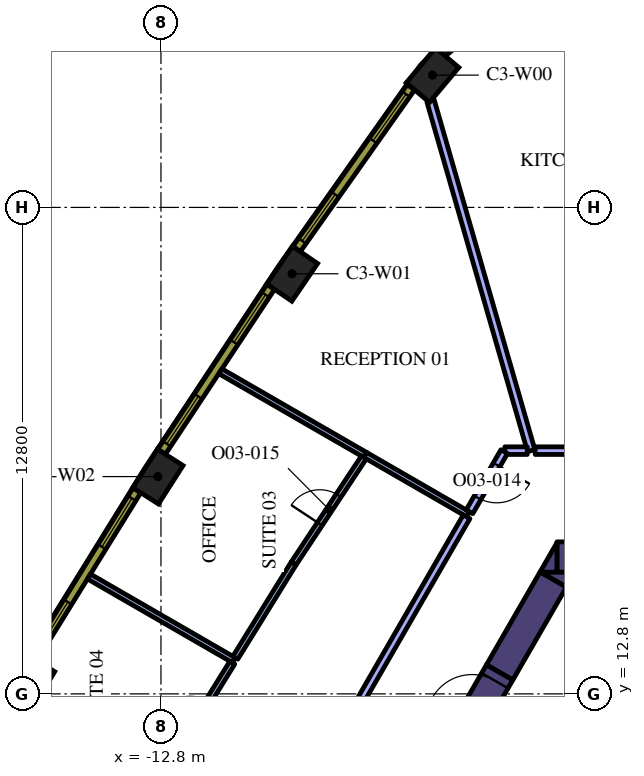
"""IFC4 building model, lengths in metres.
Left out: names, types, materials, properties, quantities, classifications, styles, units other than length and angle.
Written with IfcOpenShell. Run it as: python <this file> out.ifc"""

import sys

from ifc_helpers import new_model, si_unit, direction, frame, frame_2d, origin, origin_2d, place, context, subcontext, project, spatial, polyline, rectangle, outline, extrude, element, fill, save


model = new_model("IFC4")
c1 = context("Model", 3, precision=1e-05, world=origin(), true_north=direction((0.0, 1.0)))
c2 = subcontext(c1, "Body", "Model", "MODEL_VIEW")
j1 = project(units=[si_unit("LENGTHUNIT", "METRE"), si_unit("PLANEANGLEUNIT", "RADIAN")], contexts=[c1])
p1 = place(None, origin())
s1 = spatial("IfcSite", under=j1, at=p1, CompositionType="ELEMENT")
p2 = place(p1, origin())
s2 = spatial("IfcBuilding", under=s1, at=p2, CompositionType="ELEMENT")
p3 = place(p2, frame((0.0, 0.0, 175.2)))
s3 = spatial("IfcBuildingStorey", under=s2, at=p3, CompositionType="ELEMENT", Elevation=175.2)
for number, where, z_axis, x_axis in (
    (1, (-5.654, 29.081, 0.0), (0.0, 0.0, 1.0), (-0.644, -0.765, 0.0)),
    (2, (-9.348, 23.854, 0.0), (0.0, 0.0, 1.0), (-0.565, -0.825, 0.0)),
    (3, (-12.88, 18.517, 0.0), (0.0, 0.0, 1.0), (-0.539, -0.842, 0.0)),
    (4, (-16.247, 13.075, 0.0), (0.0, 0.0, 1.0), (-0.513, -0.858, 0.0)),
):
    element("IfcColumn", number, at=place(p3, frame(where, z_axis=z_axis, x_axis=x_axis)), inside=s3, PredefinedType="COLUMN", context=c2, shape_type="SweptSolid", body=[
        extrude(rectangle(XDim=1.2, YDim=0.8, at=origin_2d()), origin(), (0.0, 0.0, 1.0), 4.2),
    ])
p4 = place(p3, frame((-2.379, 16.4, 0.0), z_axis=(0.0, 0.0, 1.0), x_axis=(1.0, 0.0, 0.0)))
e5 = element("IfcWall", 5, at=p4, inside=s3, PredefinedType="SOLIDWALL", context=c2, shape_type="SweptSolid", body=[
    extrude(rectangle(XDim=3.824, YDim=0.8, at=frame_2d((1.912, 0.0))), origin(), (0.0, 0.0, 1.0), 4.2),
])
p5 = place(p3, origin())
e6 = element("IfcWall", 6, at=p5, inside=s3, PredefinedType="SOLIDWALL", context=c2, shape_type="SweptSolid", body=[
    extrude(outline(polyline([(-2.829, 16.0), (-2.381, 16.776), (-2.381, 16.0), (-2.829, 16.0)])), origin(), (0.0, 0.0, 1.0), 4.2),
])
p6 = place(p3, frame((-2.477, 15.81, 0.0), z_axis=(0.0, 0.0, 1.0), x_axis=(-0.499969377405, -0.866043083026, 0.0)))
e7 = element("IfcWall", 7, at=p6, inside=s3, PredefinedType="SOLIDWALL", context=c2, shape_type="SweptSolid", body=[
    extrude(rectangle(XDim=2.824, YDim=0.8, at=frame_2d((1.412, 0.0))), origin(), (0.0, 0.0, 1.0), 4.2),
])
e8 = element("IfcWall", 8, at=p5, inside=s3, PredefinedType="SOLIDWALL", context=c2, shape_type="SweptSolid", body=[
    extrude(outline(polyline([(-1.905, 16.0), (-2.129, 15.612), (-2.801, 16.0), (-1.905, 16.0)])), origin(), (0.0, 0.0, 1.0), 4.2),
])
p7 = place(p3, frame((-4.739, 11.892, 0.0), z_axis=(0.0, 0.0, 1.0), x_axis=(0.500062241894, 0.865989465428, 0.0)))
e9 = element("IfcWall", 9, at=p7, inside=s3, PredefinedType="SOLIDWALL", context=c2, shape_type="SweptSolid", body=[
    extrude(rectangle(XDim=1.7, YDim=0.8, at=frame_2d((0.85, 0.0))), origin(), (0.0, 0.0, 1.0), 4.2),
])
p8 = place(p7, frame((0.25, 0.0, 0.0)))
e10 = element("IfcOpeningElement", 10, at=p8, cuts=e9, PredefinedType="OPENING", context=c2, shape_type="SweptSolid", body=[
    extrude(rectangle(XDim=1.2, YDim=2.1, at=frame_2d((0.6, 1.05))), frame((0.0, 0.41, 0.0), z_axis=(0.0, -1.0, 0.0), x_axis=(1.0, 0.0, 0.0)), (0.0, 0.0, 1.0), 0.82),
])
p9 = place(p3, frame((-3.058, 19.2, 0.0), z_axis=(0.0, 0.0, 1.0), x_axis=(-0.276542988003, 0.961001548275, 0.0)))
e11 = element("IfcWall", 11, at=p9, inside=s3, PredefinedType="PARTITIONING", context=c2, shape_type="SweptSolid", body=[
    extrude(rectangle(XDim=9.573, YDim=0.2, at=frame_2d((4.786, 0.0))), origin(), (0.0, 0.0, 1.0), 3.15),
])
p10 = place(p3, frame((2.456, 19.2, 0.0), z_axis=(0.0, 0.0, 1.0), x_axis=(-1.0, 0.0, 0.0)))
e12 = element("IfcWall", 12, at=p10, inside=s3, PredefinedType="PARTITIONING", context=c2, shape_type="SweptSolid", body=[
    extrude(rectangle(XDim=5.41, YDim=0.2, at=frame_2d((2.705, 0.0))), origin(), (0.0, 0.0, 1.0), 3.15),
])
p11 = place(p3, frame((-7.416, 19.083, 0.0), z_axis=(0.0, 0.0, 1.0), x_axis=(-0.866028016946, 0.499995473844, 0.0)))
e13 = element("IfcWall", 13, at=p11, inside=s3, PredefinedType="PARTITIONING", context=c2, shape_type="SweptSolid", body=[
    extrude(rectangle(XDim=4.412, YDim=0.15, at=frame_2d((2.206, 0.0))), origin(), (0.0, 0.0, 1.0), 3.15),
])
p12 = place(p3, frame((-4.719, 17.526, 0.0), z_axis=(0.0, 0.0, 1.0), x_axis=(-0.866011075544, 0.500024816419, 0.0)))
e14 = element("IfcWall", 14, at=p12, inside=s3, PredefinedType="PARTITIONING", context=c2, shape_type="SweptSolid", body=[
    extrude(rectangle(XDim=3.122, YDim=0.15, at=frame_2d((1.561, 0.0))), origin(), (0.0, 0.0, 1.0), 3.15),
])
p13 = place(p3, frame((-3.162, 19.2, 0.0), z_axis=(0.0, 0.0, 1.0), x_axis=(-1.0, 0.0, 0.0)))
e15 = element("IfcWall", 15, at=p13, inside=s3, PredefinedType="PARTITIONING", context=c2, shape_type="SweptSolid", body=[
    extrude(rectangle(XDim=0.591, YDim=0.2, at=frame_2d((0.295, 0.0))), origin(), (0.0, 0.0, 1.0), 3.15),
])
p14 = place(p3, frame((-3.768, 19.174, 0.0), z_axis=(0.0, 0.0, 1.0), x_axis=(-0.499930512259, -0.866065518833, 0.0)))
e16 = element("IfcWall", 16, at=p14, inside=s3, PredefinedType="PARTITIONING", context=c2, shape_type="SweptSolid", body=[
    extrude(rectangle(XDim=1.828, YDim=0.2, at=frame_2d((0.914, 0.0))), origin(), (0.0, 0.0, 1.0), 3.15),
])
p15 = place(p14, frame((0.4, 0.0, 0.0)))
e17 = element("IfcOpeningElement", 17, at=p15, cuts=e16, PredefinedType="OPENING", context=c2, shape_type="SweptSolid", body=[
    extrude(rectangle(XDim=1.0, YDim=2.1, at=frame_2d((0.5, 1.05))), frame((0.0, 0.11, 0.0), z_axis=(0.0, -1.0, 0.0), x_axis=(1.0, 0.0, 0.0)), (0.0, 0.0, 1.0), 0.22),
])
p16 = place(p3, frame((-10.883, 13.687, 0.0), z_axis=(0.0, 0.0, 1.0), x_axis=(-0.866033195618, 0.499986503906, 0.0)))
e18 = element("IfcWall", 18, at=p16, inside=s3, PredefinedType="PARTITIONING", context=c2, shape_type="SweptSolid", body=[
    extrude(rectangle(XDim=4.402, YDim=0.15, at=frame_2d((2.201, 0.0))), origin(), (0.0, 0.0, 1.0), 3.15),
])
p17 = place(p3, frame((-9.308, 16.231, 0.0), z_axis=(0.0, 0.0, 1.0), x_axis=(0.551902709159, 0.833908507945, 0.0)))
e19 = element("IfcWall", 19, at=p17, inside=s3, PredefinedType="PARTITIONING", context=c2, shape_type="SweptSolid", body=[
    extrude(rectangle(XDim=3.347, YDim=0.15, at=frame_2d((1.673, 0.0))), origin(), (0.0, 0.0, 1.0), 3.15),
])
p18 = place(p17, frame((1.247, 0.0, 0.0)))
e20 = element("IfcOpeningElement", 20, at=p18, cuts=e19, PredefinedType="OPENING", context=c2, shape_type="SweptSolid", body=[
    extrude(rectangle(XDim=0.9, YDim=2.1, at=frame_2d((0.45, 1.05))), frame((0.0, 0.085, 0.0), z_axis=(0.0, -1.0, 0.0), x_axis=(1.0, 0.0, 0.0)), (0.0, 0.0, 1.0), 0.17),
])
p19 = place(p3, frame((-9.308, 16.231, 0.0), z_axis=(0.0, 0.0, 1.0), x_axis=(-0.526201893736, -0.850359669216, 0.0)))
e21 = element("IfcWall", 21, at=p19, inside=s3, PredefinedType="PARTITIONING", context=c2, shape_type="SweptSolid", body=[
    extrude(rectangle(XDim=2.917, YDim=0.15, at=frame_2d((1.458, 0.0))), origin(), (0.0, 0.0, 1.0), 3.15),
])
p20 = place(p3, frame((-12.608, 10.899, 0.0), z_axis=(0.0, 0.0, 1.0), x_axis=(0.526170942761, 0.850378820876, 0.0)))
e22 = element("IfcWall", 22, at=p20, inside=s3, PredefinedType="PARTITIONING", context=c2, shape_type="SweptSolid", body=[
    extrude(rectangle(XDim=3.203, YDim=0.15, at=frame_2d((1.602, 0.0))), origin(), (0.0, 0.0, 1.0), 3.15),
])
p21 = place(p20, frame((1.103, 0.0, 0.0)))
e23 = element("IfcOpeningElement", 23, at=p21, cuts=e22, PredefinedType="OPENING", context=c2, shape_type="SweptSolid", body=[
    extrude(rectangle(XDim=0.9, YDim=2.1, at=frame_2d((0.45, 1.05))), frame((0.0, 0.085, 0.0), z_axis=(0.0, -1.0, 0.0), x_axis=(1.0, 0.0, 0.0)), (0.0, 0.0, 1.0), 0.17),
])
p22 = place(p3, frame((-4.757, 17.461, 0.0), z_axis=(0.0, 0.0, 1.0), x_axis=(-0.499998278779, -0.866026397529, 0.0)))
e24 = element("IfcWall", 24, at=p22, inside=s3, PredefinedType="PARTITIONING", context=c2, shape_type="SweptSolid", body=[
    extrude(rectangle(XDim=8.709, YDim=0.2, at=frame_2d((4.354, 0.0))), origin(), (0.0, 0.0, 1.0), 3.15),
])
p23 = place(p3, frame((-3.678, 31.131, 0.0), z_axis=(0.0, 0.0, 1.0), x_axis=(-0.761419744247, -0.648259186645, 0.0)))
e25 = element("IfcWall", 25, at=p23, inside=s3, PredefinedType="SOLIDWALL", context=c2, shape_type="SweptSolid", body=[
    extrude(rectangle(XDim=2.25, YDim=0.24, at=frame_2d((1.125, 0.0))), origin(), (0.0, 0.0, 1.0), 3.95),
])
p24 = place(p23, frame((0.625, 0.0, 0.9)))
e26 = element("IfcOpeningElement", 26, at=p24, cuts=e25, PredefinedType="OPENING", context=c2, shape_type="SweptSolid", body=[
    extrude(rectangle(XDim=1.0, YDim=2.55, at=frame_2d((0.5, 1.275))), frame((0.0, 0.13, 0.0), z_axis=(0.0, -1.0, 0.0), x_axis=(1.0, 0.0, 0.0)), (0.0, 0.0, 1.0), 0.26),
])
p25 = place(p3, frame((-6.223, 28.762, 0.0), z_axis=(0.0, 0.0, 1.0), x_axis=(-0.577115207679, -0.816662743772, 0.0)))
e27 = element("IfcWall", 27, at=p25, inside=s3, PredefinedType="SOLIDWALL", context=c2, shape_type="SweptSolid", body=[
    extrude(rectangle(XDim=5.213, YDim=0.24, at=frame_2d((2.606, 0.0))), origin(), (0.0, 0.0, 1.0), 3.95),
])
p26 = place(p25, frame((0.221, 0.0, 0.9)))
e28 = element("IfcOpeningElement", 28, at=p26, cuts=e27, PredefinedType="OPENING", context=c2, shape_type="SweptSolid", body=[
    extrude(rectangle(XDim=1.5, YDim=2.55, at=frame_2d((0.75, 1.275))), frame((0.0, 0.13, 0.0), z_axis=(0.0, -1.0, 0.0), x_axis=(1.0, 0.0, 0.0)), (0.0, 0.0, 1.0), 0.26),
])
p27 = place(p25, frame((3.452, 0.0, 0.9)))
e29 = element("IfcOpeningElement", 29, at=p27, cuts=e27, PredefinedType="OPENING", context=c2, shape_type="SweptSolid", body=[
    extrude(rectangle(XDim=1.5, YDim=2.55, at=frame_2d((0.75, 1.275))), frame((0.0, 0.13, 0.0), z_axis=(0.0, -1.0, 0.0), x_axis=(1.0, 0.0, 0.0)), (0.0, 0.0, 1.0), 0.26),
])
p28 = place(p3, frame((-9.911, 23.51, 0.0), z_axis=(0.0, 0.0, 1.0), x_axis=(-0.551892811511, -0.833915058386, 0.0)))
e30 = element("IfcWall", 30, at=p28, inside=s3, PredefinedType="SOLIDWALL", context=c2, shape_type="SweptSolid", body=[
    extrude(rectangle(XDim=5.204, YDim=0.24, at=frame_2d((2.602, 0.0))), origin(), (0.0, 0.0, 1.0), 3.95),
])
p29 = place(p28, frame((0.248, 0.0, 0.9)))
e31 = element("IfcOpeningElement", 31, at=p29, cuts=e30, PredefinedType="OPENING", context=c2, shape_type="SweptSolid", body=[
    extrude(rectangle(XDim=1.5, YDim=2.55, at=frame_2d((0.75, 1.275))), frame((0.0, 0.13, 0.0), z_axis=(0.0, -1.0, 0.0), x_axis=(1.0, 0.0, 0.0)), (0.0, 0.0, 1.0), 0.26),
])
p30 = place(p28, frame((3.455, 0.0, 0.9)))
e32 = element("IfcOpeningElement", 32, at=p30, cuts=e30, PredefinedType="OPENING", context=c2, shape_type="SweptSolid", body=[
    extrude(rectangle(XDim=1.5, YDim=2.55, at=frame_2d((0.75, 1.275))), frame((0.0, 0.13, 0.0), z_axis=(0.0, -1.0, 0.0), x_axis=(1.0, 0.0, 0.0)), (0.0, 0.0, 1.0), 0.26),
])
p31 = place(p3, frame((-13.433, 18.156, 0.0), z_axis=(0.0, 0.0, 1.0), x_axis=(-0.526197926587, -0.850362124072, 0.0)))
e33 = element("IfcWall", 33, at=p31, inside=s3, PredefinedType="SOLIDWALL", context=c2, shape_type="SweptSolid", body=[
    extrude(rectangle(XDim=5.203, YDim=0.24, at=frame_2d((2.602, 0.0))), origin(), (0.0, 0.0, 1.0), 3.95),
])
p32 = place(p31, frame((0.248, 0.0, 0.9)))
e34 = element("IfcOpeningElement", 34, at=p32, cuts=e33, PredefinedType="OPENING", context=c2, shape_type="SweptSolid", body=[
    extrude(rectangle(XDim=1.5, YDim=2.55, at=frame_2d((0.75, 1.275))), frame((0.0, 0.13, 0.0), z_axis=(0.0, -1.0, 0.0), x_axis=(1.0, 0.0, 0.0)), (0.0, 0.0, 1.0), 0.26),
])
p33 = place(p31, frame((3.455, 0.0, 0.9)))
e35 = element("IfcOpeningElement", 35, at=p33, cuts=e33, PredefinedType="OPENING", context=c2, shape_type="SweptSolid", body=[
    extrude(rectangle(XDim=1.5, YDim=2.55, at=frame_2d((0.75, 1.275))), frame((0.0, 0.13, 0.0), z_axis=(0.0, -1.0, 0.0), x_axis=(1.0, 0.0, 0.0)), (0.0, 0.0, 1.0), 0.26),
])
p34 = place(p8, origin())
e36 = element("IfcDoor", 36, at=p34, inside=s3, OperationType="SINGLE_SWING_LEFT", PredefinedType="DOOR", context=c2, shape_type="SweptSolid", body=[
    extrude(rectangle(XDim=1.2, YDim=2.1, at=frame_2d((0.6, 1.05))), frame((0.0, 0.025, 0.0), z_axis=(0.0, -1.0, 0.0), x_axis=(1.0, 0.0, 0.0)), (0.0, 0.0, 1.0), 0.05),
])
fill(e10, e36)
p35 = place(p15, origin())
e37 = element("IfcDoor", 37, at=p35, inside=s3, OperationType="SINGLE_SWING_LEFT", PredefinedType="DOOR", context=c2, shape_type="SweptSolid", body=[
    extrude(rectangle(XDim=1.0, YDim=2.1, at=frame_2d((0.5, 1.05))), frame((0.0, 0.025, 0.0), z_axis=(0.0, -1.0, 0.0), x_axis=(1.0, 0.0, 0.0)), (0.0, 0.0, 1.0), 0.05),
])
fill(e17, e37)
p36 = place(p18, origin())
e38 = element("IfcDoor", 38, at=p36, inside=s3, OperationType="SINGLE_SWING_RIGHT", PredefinedType="DOOR", context=c2, shape_type="SweptSolid", body=[
    extrude(rectangle(XDim=0.9, YDim=2.1, at=frame_2d((0.45, 1.05))), frame((0.0, 0.025, 0.0), z_axis=(0.0, -1.0, 0.0), x_axis=(1.0, 0.0, 0.0)), (0.0, 0.0, 1.0), 0.05),
])
fill(e20, e38)
p37 = place(p26, origin())
e39 = element("IfcWindow", 39, at=p37, inside=s3, PartitioningType="SINGLE_PANEL", PredefinedType="WINDOW", context=c2, shape_type="SweptSolid", body=[
    extrude(rectangle(XDim=1.5, YDim=2.55, at=frame_2d((0.75, 1.275))), frame((0.0, 0.04, 0.0), z_axis=(0.0, -1.0, 0.0), x_axis=(1.0, 0.0, 0.0)), (0.0, 0.0, 1.0), 0.06),
])
fill(e28, e39)
p38 = place(p27, origin())
e40 = element("IfcWindow", 40, at=p38, inside=s3, PartitioningType="SINGLE_PANEL", PredefinedType="WINDOW", context=c2, shape_type="SweptSolid", body=[
    extrude(rectangle(XDim=1.5, YDim=2.55, at=frame_2d((0.75, 1.275))), frame((0.0, 0.04, 0.0), z_axis=(0.0, -1.0, 0.0), x_axis=(1.0, 0.0, 0.0)), (0.0, 0.0, 1.0), 0.06),
])
fill(e29, e40)
p39 = place(p29, origin())
e41 = element("IfcWindow", 41, at=p39, inside=s3, PartitioningType="SINGLE_PANEL", PredefinedType="WINDOW", context=c2, shape_type="SweptSolid", body=[
    extrude(rectangle(XDim=1.5, YDim=2.55, at=frame_2d((0.75, 1.275))), frame((0.0, 0.04, 0.0), z_axis=(0.0, -1.0, 0.0), x_axis=(1.0, 0.0, 0.0)), (0.0, 0.0, 1.0), 0.06),
])
fill(e31, e41)
p40 = place(p30, origin())
e42 = element("IfcWindow", 42, at=p40, inside=s3, PartitioningType="SINGLE_PANEL", PredefinedType="WINDOW", context=c2, shape_type="SweptSolid", body=[
    extrude(rectangle(XDim=1.5, YDim=2.55, at=frame_2d((0.75, 1.275))), frame((0.0, 0.04, 0.0), z_axis=(0.0, -1.0, 0.0), x_axis=(1.0, 0.0, 0.0)), (0.0, 0.0, 1.0), 0.06),
])
fill(e32, e42)
p41 = place(p32, origin())
e43 = element("IfcWindow", 43, at=p41, inside=s3, PartitioningType="SINGLE_PANEL", PredefinedType="WINDOW", context=c2, shape_type="SweptSolid", body=[
    extrude(rectangle(XDim=1.5, YDim=2.55, at=frame_2d((0.75, 1.275))), frame((0.0, 0.04, 0.0), z_axis=(0.0, -1.0, 0.0), x_axis=(1.0, 0.0, 0.0)), (0.0, 0.0, 1.0), 0.06),
])
fill(e34, e43)
p42 = place(p33, origin())
e44 = element("IfcWindow", 44, at=p42, inside=s3, PartitioningType="SINGLE_PANEL", PredefinedType="WINDOW", context=c2, shape_type="SweptSolid", body=[
    extrude(rectangle(XDim=1.5, YDim=2.55, at=frame_2d((0.75, 1.275))), frame((0.0, 0.04, 0.0), z_axis=(0.0, -1.0, 0.0), x_axis=(1.0, 0.0, 0.0)), (0.0, 0.0, 1.0), 0.06),
])
fill(e35, e44)
save(model, sys.argv[1])
